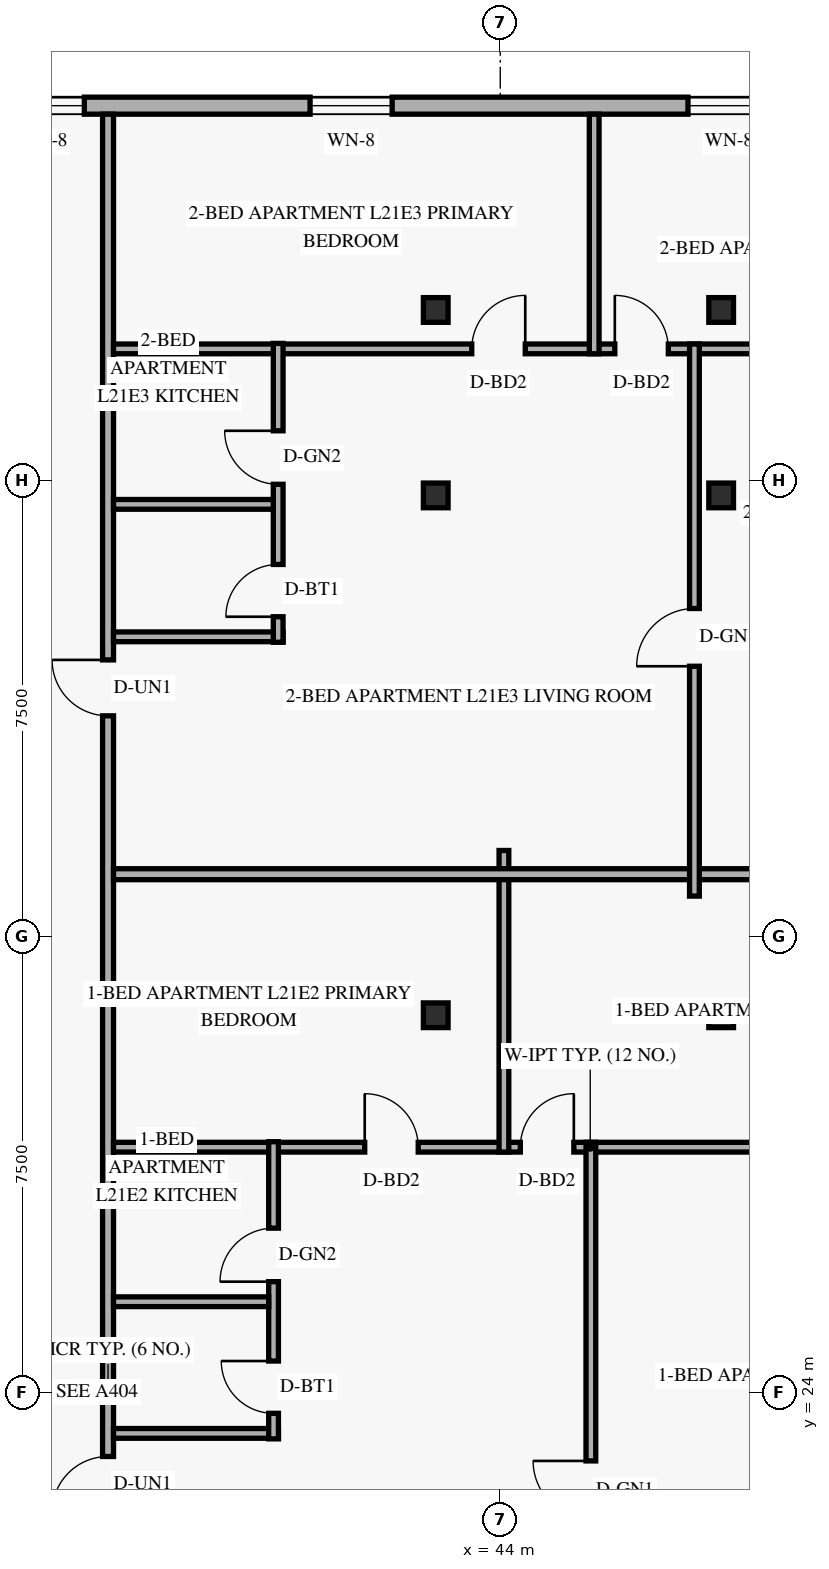
"""IFC4 building model, lengths in metres.
Left out: names, types, materials, properties, quantities, classifications, styles, units other than length and angle.
Written with IfcOpenShell. Run it as: python <this file> out.ifc"""

import sys

from ifc_helpers import new_model, si_unit, direction, frame, frame_2d, origin, origin_2d, place, context, subcontext, project, spatial, rectangle, hollow_rectangle, extrude, element, fill, save


model = new_model("IFC4")
c1 = context("Model", 3, precision=1e-05, world=origin(), true_north=direction((0.0, 1.0)))
c2 = subcontext(c1, "Body", "Model", "MODEL_VIEW")
j1 = project(units=[si_unit("LENGTHUNIT", "METRE"), si_unit("PLANEANGLEUNIT", "RADIAN")], contexts=[c1])
p1 = place(None, origin())
s1 = spatial("IfcSite", under=j1, at=p1, CompositionType="ELEMENT")
p2 = place(p1, origin())
s2 = spatial("IfcBuilding", under=s1, at=p2, CompositionType="ELEMENT")
p3 = place(p2, frame((0.0, 0.0, 84.0)))
s3 = spatial("IfcBuildingStorey", under=s2, at=p3, CompositionType="ELEMENT", Elevation=84.0)
for number, where, z_axis, x_axis in (
    (1, (42.876, 30.2, 0.0), (0.035, 0.0, 0.999), (0.0, 1.0, 0.0)),
    (2, (42.876, 38.75, 0.0), (0.035, 0.0, 0.999), (0.0, 1.0, 0.0)),
    (3, (42.876, 41.8, 0.0), (0.035, 0.0, 0.999), (0.0, 1.0, 0.0)),
):
    element("IfcColumn", number, at=place(p3, frame(where, z_axis=z_axis, x_axis=x_axis)), inside=s3, PredefinedType="COLUMN", context=c2, shape_type="SweptSolid", body=[
        extrude(hollow_rectangle(XDim=0.406, YDim=0.406, WallThickness=0.016, at=origin_2d()), origin(), (0.0, 0.0, 1.0), 3.602),
    ])
for number, where, z_axis, x_axis in (
    (4, (47.529, 30.2, 0.0), (0.058, 0.0, 0.998), (0.0, 1.0, 0.0)),
    (5, (47.529, 38.75, 0.0), (0.058, 0.0, 0.998), (0.0, 1.0, 0.0)),
    (6, (47.529, 41.8, 0.0), (0.058, 0.0, 0.998), (0.0, 1.0, 0.0)),
):
    element("IfcColumn", number, at=place(p3, frame(where, z_axis=z_axis, x_axis=x_axis)), inside=s3, PredefinedType="COLUMN", context=c2, shape_type="SweptSolid", body=[
        extrude(hollow_rectangle(XDim=0.406, YDim=0.406, WallThickness=0.016, at=origin_2d()), origin(), (0.0, 0.0, 1.0), 3.606),
    ])
p4 = place(p3, frame((49.98, 45.16, 0.0), z_axis=(0.0, 0.0, 1.0), x_axis=(-1.0, 0.0, 0.0)))
e7 = element("IfcWall", 7, at=p4, inside=s3, PredefinedType="SOLIDWALL", context=c2, shape_type="SweptSolid", body=[
    extrude(rectangle(XDim=36.56, YDim=0.28, at=frame_2d((18.28, 0.0))), origin(), (0.0, 0.0, 1.0), 3.36),
])
p5 = place(p4, frame((31.14, 0.0, 0.85)))
e8 = element("IfcOpeningElement", 8, at=p5, cuts=e7, PredefinedType="OPENING", context=c2, shape_type="SweptSolid", body=[
    extrude(rectangle(XDim=1.35, YDim=1.55, at=frame_2d((0.675, 0.775))), frame((0.0, 0.15, 0.0), z_axis=(0.0, -1.0, 0.0), x_axis=(1.0, 0.0, 0.0)), (0.0, 0.0, 1.0), 0.3),
])
p6 = place(p4, frame((26.605, 0.0, 0.85)))
e9 = element("IfcOpeningElement", 9, at=p6, cuts=e7, PredefinedType="OPENING", context=c2, shape_type="SweptSolid", body=[
    extrude(rectangle(XDim=1.35, YDim=1.55, at=frame_2d((0.675, 0.775))), frame((0.0, 0.15, 0.0), z_axis=(0.0, -1.0, 0.0), x_axis=(1.0, 0.0, 0.0)), (0.0, 0.0, 1.0), 0.3),
])
p7 = place(p4, frame((22.754, 0.0, 0.85)))
e10 = element("IfcOpeningElement", 10, at=p7, cuts=e7, PredefinedType="OPENING", context=c2, shape_type="SweptSolid", body=[
    extrude(rectangle(XDim=1.35, YDim=1.55, at=frame_2d((0.675, 0.775))), frame((0.0, 0.15, 0.0), z_axis=(0.0, -1.0, 0.0), x_axis=(1.0, 0.0, 0.0)), (0.0, 0.0, 1.0), 0.3),
])
p8 = place(p4, frame((16.919, 0.0, 0.85)))
e11 = element("IfcOpeningElement", 11, at=p8, cuts=e7, PredefinedType="OPENING", context=c2, shape_type="SweptSolid", body=[
    extrude(rectangle(XDim=1.35, YDim=1.55, at=frame_2d((0.675, 0.775))), frame((0.0, 0.15, 0.0), z_axis=(0.0, -1.0, 0.0), x_axis=(1.0, 0.0, 0.0)), (0.0, 0.0, 1.0), 0.3),
])
p9 = place(p4, frame((12.82, 0.0, 0.85)))
e12 = element("IfcOpeningElement", 12, at=p9, cuts=e7, PredefinedType="OPENING", context=c2, shape_type="SweptSolid", body=[
    extrude(rectangle(XDim=1.35, YDim=1.55, at=frame_2d((0.675, 0.775))), frame((0.0, 0.15, 0.0), z_axis=(0.0, -1.0, 0.0), x_axis=(1.0, 0.0, 0.0)), (0.0, 0.0, 1.0), 0.3),
])
p10 = place(p4, frame((7.758, 0.0, 0.85)))
e13 = element("IfcOpeningElement", 13, at=p10, cuts=e7, PredefinedType="OPENING", context=c2, shape_type="SweptSolid", body=[
    extrude(rectangle(XDim=1.35, YDim=1.55, at=frame_2d((0.675, 0.775))), frame((0.0, 0.15, 0.0), z_axis=(0.0, -1.0, 0.0), x_axis=(1.0, 0.0, 0.0)), (0.0, 0.0, 1.0), 0.3),
])
p11 = place(p4, frame((1.542, 0.0, 0.85)))
e14 = element("IfcOpeningElement", 14, at=p11, cuts=e7, PredefinedType="OPENING", context=c2, shape_type="SweptSolid", body=[
    extrude(rectangle(XDim=1.35, YDim=1.55, at=frame_2d((0.675, 0.775))), frame((0.0, 0.15, 0.0), z_axis=(0.0, -1.0, 0.0), x_axis=(1.0, 0.0, 0.0)), (0.0, 0.0, 1.0), 0.3),
])
p12 = place(p3, frame((37.55, 2.98, 0.0), z_axis=(0.0, 0.0, 1.0), x_axis=(0.0, 1.0, 0.0)))
e15 = element("IfcWall", 15, at=p12, inside=s3, PredefinedType="STANDARD", context=c2, shape_type="SweptSolid", body=[
    extrude(rectangle(XDim=42.04, YDim=0.18, at=frame_2d((21.02, 0.0))), origin(), (0.0, 0.0, 1.0), 2.731),
])
p13 = place(p12, frame((8.69, 0.0, 0.0)))
e16 = element("IfcOpeningElement", 16, at=p13, cuts=e15, PredefinedType="OPENING", context=c2, shape_type="SweptSolid", body=[
    extrude(rectangle(XDim=0.92, YDim=2.15, at=frame_2d((0.46, 1.075))), frame((0.0, 0.1, 0.0), z_axis=(0.0, -1.0, 0.0), x_axis=(1.0, 0.0, 0.0)), (0.0, 0.0, 1.0), 0.2),
])
p14 = place(p12, frame((19.043, 0.0, 0.0)))
e17 = element("IfcOpeningElement", 17, at=p14, cuts=e15, PredefinedType="OPENING", context=c2, shape_type="SweptSolid", body=[
    extrude(rectangle(XDim=0.92, YDim=2.15, at=frame_2d((0.46, 1.075))), frame((0.0, 0.1, 0.0), z_axis=(0.0, -1.0, 0.0), x_axis=(1.0, 0.0, 0.0)), (0.0, 0.0, 1.0), 0.2),
])
p15 = place(p12, frame((32.145, 0.0, 0.0)))
e18 = element("IfcOpeningElement", 18, at=p15, cuts=e15, PredefinedType="OPENING", context=c2, shape_type="SweptSolid", body=[
    extrude(rectangle(XDim=0.92, YDim=2.15, at=frame_2d((0.46, 1.075))), frame((0.0, 0.1, 0.0), z_axis=(0.0, -1.0, 0.0), x_axis=(1.0, 0.0, 0.0)), (0.0, 0.0, 1.0), 0.2),
])
p16 = place(p3, frame((37.64, 28.03, 0.0), z_axis=(0.0, 0.0, 1.0), x_axis=(1.0, 0.0, 0.0)))
e19 = element("IfcWall", 19, at=p16, inside=s3, PredefinedType="PARTITIONING", context=c2, shape_type="SweptSolid", body=[
    extrude(rectangle(XDim=15.68, YDim=0.16, at=frame_2d((7.84, 0.0))), origin(), (0.0, 0.0, 1.0), 2.731),
])
p17 = place(p16, frame((4.131, 0.0, 0.0)))
e20 = element("IfcOpeningElement", 20, at=p17, cuts=e19, PredefinedType="OPENING", context=c2, shape_type="SweptSolid", body=[
    extrude(rectangle(XDim=0.88, YDim=2.14, at=frame_2d((0.44, 1.07))), frame((0.0, 0.09, 0.0), z_axis=(0.0, -1.0, 0.0), x_axis=(1.0, 0.0, 0.0)), (0.0, 0.0, 1.0), 0.18),
])
p18 = place(p16, frame((6.69, 0.0, 0.0)))
e21 = element("IfcOpeningElement", 21, at=p18, cuts=e19, PredefinedType="OPENING", context=c2, shape_type="SweptSolid", body=[
    extrude(rectangle(XDim=0.88, YDim=2.14, at=frame_2d((0.44, 1.07))), frame((0.0, 0.09, 0.0), z_axis=(0.0, -1.0, 0.0), x_axis=(1.0, 0.0, 0.0)), (0.0, 0.0, 1.0), 0.18),
])
p19 = place(p3, frame((37.64, 23.323, 0.0), z_axis=(0.0, 0.0, 1.0), x_axis=(1.0, 0.0, 0.0)))
e22 = element("IfcWall", 22, at=p19, inside=s3, PredefinedType="PLUMBINGWALL", context=c2, shape_type="SweptSolid", body=[
    extrude(rectangle(XDim=2.712, YDim=0.16, at=frame_2d((1.356, 0.0))), origin(), (0.0, 0.0, 1.0), 3.36),
])
p20 = place(p3, frame((40.272, 23.233, 0.0), z_axis=(0.0, 0.0, 1.0), x_axis=(0.0, 1.0, 0.0)))
e23 = element("IfcWall", 23, at=p20, inside=s3, PredefinedType="PLUMBINGWALL", context=c2, shape_type="SweptSolid", body=[
    extrude(rectangle(XDim=4.887, YDim=0.16, at=frame_2d((2.444, 0.0))), origin(), (0.0, 0.0, 1.0), 3.36),
])
p21 = place(p20, frame((0.42, 0.0, 0.0)))
e24 = element("IfcOpeningElement", 24, at=p21, cuts=e23, PredefinedType="OPENING", context=c2, shape_type="SweptSolid", body=[
    extrude(rectangle(XDim=0.86, YDim=2.12, at=frame_2d((0.43, 1.06))), frame((0.0, 0.09, 0.0), z_axis=(0.0, -1.0, 0.0), x_axis=(1.0, 0.0, 0.0)), (0.0, 0.0, 1.0), 0.18),
])
p22 = place(p20, frame((2.585, 0.0, 0.0)))
e25 = element("IfcOpeningElement", 25, at=p22, cuts=e23, PredefinedType="OPENING", context=c2, shape_type="SweptSolid", body=[
    extrude(rectangle(XDim=0.88, YDim=2.12, at=frame_2d((0.44, 1.06))), frame((0.0, 0.09, 0.0), z_axis=(0.0, -1.0, 0.0), x_axis=(1.0, 0.0, 0.0)), (0.0, 0.0, 1.0), 0.18),
])
p23 = place(p3, frame((37.64, 25.488, 0.0), z_axis=(0.0, 0.0, 1.0), x_axis=(1.0, 0.0, 0.0)))
e26 = element("IfcWall", 26, at=p23, inside=s3, PredefinedType="PLUMBINGWALL", context=c2, shape_type="SweptSolid", body=[
    extrude(rectangle(XDim=2.552, YDim=0.16, at=frame_2d((1.276, 0.0))), origin(), (0.0, 0.0, 1.0), 3.36),
])
p24 = place(p3, frame((45.49, 17.25, 0.0), z_axis=(0.0, 0.0, 1.0), x_axis=(0.0, 1.0, 0.0)))
e27 = element("IfcWall", 27, at=p24, inside=s3, PredefinedType="PARTITIONING", context=c2, shape_type="SweptSolid", body=[
    extrude(rectangle(XDim=10.86, YDim=0.16, at=frame_2d((5.43, 0.0))), origin(), (0.0, 0.0, 1.0), 2.731),
])
p25 = place(p24, frame((4.67, 0.0, 0.0)))
e28 = element("IfcOpeningElement", 28, at=p25, cuts=e27, PredefinedType="OPENING", context=c2, shape_type="SweptSolid", body=[
    extrude(rectangle(XDim=0.95, YDim=2.15, at=frame_2d((0.475, 1.075))), frame((0.0, 0.09, 0.0), z_axis=(0.0, -1.0, 0.0), x_axis=(1.0, 0.0, 0.0)), (0.0, 0.0, 1.0), 0.18),
])
p26 = place(p3, frame((44.061, 27.95, 0.0), z_axis=(0.0, 0.0, 1.0), x_axis=(0.0, 1.0, 0.0)))
e29 = element("IfcWall", 29, at=p26, inside=s3, PredefinedType="PARTITIONING", context=c2, shape_type="SweptSolid", body=[
    extrude(rectangle(XDim=4.96, YDim=0.16, at=frame_2d((2.48, 0.0))), origin(), (0.0, 0.0, 1.0), 2.731),
])
p27 = place(p3, frame((37.64, 32.52, 0.0), z_axis=(0.0, 0.0, 1.0), x_axis=(1.0, 0.0, 0.0)))
e30 = element("IfcWall", 30, at=p27, inside=s3, PredefinedType="PARTITIONING", context=c2, shape_type="SweptSolid", body=[
    extrude(rectangle(XDim=15.68, YDim=0.18, at=frame_2d((7.84, 0.0))), origin(), (0.0, 0.0, 1.0), 2.731),
])
p28 = place(p3, frame((37.64, 41.16, 0.0), z_axis=(0.0, 0.0, 1.0), x_axis=(1.0, 0.0, 0.0)))
e31 = element("IfcWall", 31, at=p28, inside=s3, PredefinedType="PARTITIONING", context=c2, shape_type="SweptSolid", body=[
    extrude(rectangle(XDim=15.68, YDim=0.16, at=frame_2d((7.84, 0.0))), origin(), (0.0, 0.0, 1.0), 2.731),
])
p29 = place(p28, frame((5.892, 0.0, 0.0)))
e32 = element("IfcOpeningElement", 32, at=p29, cuts=e31, PredefinedType="OPENING", context=c2, shape_type="SweptSolid", body=[
    extrude(rectangle(XDim=0.88, YDim=2.14, at=frame_2d((0.44, 1.07))), frame((0.0, 0.09, 0.0), z_axis=(0.0, -1.0, 0.0), x_axis=(1.0, 0.0, 0.0)), (0.0, 0.0, 1.0), 0.18),
])
p30 = place(p28, frame((8.244, 0.0, 0.0)))
e33 = element("IfcOpeningElement", 33, at=p30, cuts=e31, PredefinedType="OPENING", context=c2, shape_type="SweptSolid", body=[
    extrude(rectangle(XDim=0.88, YDim=2.14, at=frame_2d((0.44, 1.07))), frame((0.0, 0.09, 0.0), z_axis=(0.0, -1.0, 0.0), x_axis=(1.0, 0.0, 0.0)), (0.0, 0.0, 1.0), 0.18),
])
p31 = place(p3, frame((37.64, 36.425, 0.0), z_axis=(0.0, 0.0, 1.0), x_axis=(1.0, 0.0, 0.0)))
e34 = element("IfcWall", 34, at=p31, inside=s3, PredefinedType="PLUMBINGWALL", context=c2, shape_type="SweptSolid", body=[
    extrude(rectangle(XDim=2.788, YDim=0.16, at=frame_2d((1.394, 0.0))), origin(), (0.0, 0.0, 1.0), 3.36),
])
p32 = place(p3, frame((40.348, 36.334, 0.0), z_axis=(0.0, 0.0, 1.0), x_axis=(0.0, 1.0, 0.0)))
e35 = element("IfcWall", 35, at=p32, inside=s3, PredefinedType="PLUMBINGWALL", context=c2, shape_type="SweptSolid", body=[
    extrude(rectangle(XDim=4.916, YDim=0.16, at=frame_2d((2.458, 0.0))), origin(), (0.0, 0.0, 1.0), 2.731),
])
p33 = place(p32, frame((0.42, 0.0, 0.0)))
e36 = element("IfcOpeningElement", 36, at=p33, cuts=e35, PredefinedType="OPENING", context=c2, shape_type="SweptSolid", body=[
    extrude(rectangle(XDim=0.86, YDim=2.12, at=frame_2d((0.43, 1.06))), frame((0.0, 0.09, 0.0), z_axis=(0.0, -1.0, 0.0), x_axis=(1.0, 0.0, 0.0)), (0.0, 0.0, 1.0), 0.18),
])
p34 = place(p32, frame((2.598, 0.0, 0.0)))
e37 = element("IfcOpeningElement", 37, at=p34, cuts=e35, PredefinedType="OPENING", context=c2, shape_type="SweptSolid", body=[
    extrude(rectangle(XDim=0.88, YDim=2.12, at=frame_2d((0.44, 1.06))), frame((0.0, 0.09, 0.0), z_axis=(0.0, -1.0, 0.0), x_axis=(1.0, 0.0, 0.0)), (0.0, 0.0, 1.0), 0.18),
])
p35 = place(p3, frame((37.64, 38.603, 0.0), z_axis=(0.0, 0.0, 1.0), x_axis=(1.0, 0.0, 0.0)))
e38 = element("IfcWall", 38, at=p35, inside=s3, PredefinedType="PLUMBINGWALL", context=c2, shape_type="SweptSolid", body=[
    extrude(rectangle(XDim=2.628, YDim=0.16, at=frame_2d((1.314, 0.0))), origin(), (0.0, 0.0, 1.0), 2.731),
])
p36 = place(p3, frame((47.194, 32.16, 0.0), z_axis=(0.0, 0.0, 1.0), x_axis=(0.0, 1.0, 0.0)))
e39 = element("IfcWall", 39, at=p36, inside=s3, PredefinedType="PARTITIONING", context=c2, shape_type="SweptSolid", body=[
    extrude(rectangle(XDim=9.08, YDim=0.16, at=frame_2d((4.54, 0.0))), origin(), (0.0, 0.0, 1.0), 2.731),
])
p37 = place(p36, frame((3.78, 0.0, 0.0)))
e40 = element("IfcOpeningElement", 40, at=p37, cuts=e39, PredefinedType="OPENING", context=c2, shape_type="SweptSolid", body=[
    extrude(rectangle(XDim=0.95, YDim=2.15, at=frame_2d((0.475, 1.075))), frame((0.0, 0.09, 0.0), z_axis=(0.0, -1.0, 0.0), x_axis=(1.0, 0.0, 0.0)), (0.0, 0.0, 1.0), 0.18),
])
p38 = place(p3, frame((45.545, 41.08, 0.0), z_axis=(0.0, 0.0, 1.0), x_axis=(0.0, 1.0, 0.0)))
e41 = element("IfcWall", 41, at=p38, inside=s3, PredefinedType="PARTITIONING", context=c2, shape_type="SweptSolid", body=[
    extrude(rectangle(XDim=3.94, YDim=0.16, at=frame_2d((1.97, 0.0))), origin(), (0.0, 0.0, 1.0), 2.809),
])
p39 = place(p9, origin())
e42 = element("IfcWindow", 42, at=p39, inside=s3, PartitioningType="SINGLE_PANEL", PredefinedType="WINDOW", context=c2, shape_type="SweptSolid", body=[
    extrude(rectangle(XDim=1.35, YDim=1.55, at=frame_2d((0.675, 0.775))), frame((0.0, 0.03, 0.0), z_axis=(0.0, -1.0, 0.0), x_axis=(1.0, 0.0, 0.0)), (0.0, 0.0, 1.0), 0.06),
])
fill(e12, e42)
p40 = place(p10, origin())
e43 = element("IfcWindow", 43, at=p40, inside=s3, PartitioningType="SINGLE_PANEL", PredefinedType="WINDOW", context=c2, shape_type="SweptSolid", body=[
    extrude(rectangle(XDim=1.35, YDim=1.55, at=frame_2d((0.675, 0.775))), frame((0.0, 0.03, 0.0), z_axis=(0.0, -1.0, 0.0), x_axis=(1.0, 0.0, 0.0)), (0.0, 0.0, 1.0), 0.06),
])
fill(e13, e43)
p41 = place(p11, origin())
e44 = element("IfcWindow", 44, at=p41, inside=s3, PartitioningType="SINGLE_PANEL", PredefinedType="WINDOW", context=c2, shape_type="SweptSolid", body=[
    extrude(rectangle(XDim=1.35, YDim=1.55, at=frame_2d((0.675, 0.775))), frame((0.0, 0.03, 0.0), z_axis=(0.0, -1.0, 0.0), x_axis=(1.0, 0.0, 0.0)), (0.0, 0.0, 1.0), 0.06),
])
fill(e14, e44)
p42 = place(p25, origin())
e45 = element("IfcDoor", 45, at=p42, inside=s3, OperationType="SINGLE_SWING_RIGHT", PredefinedType="DOOR", context=c2, shape_type="SweptSolid", body=[
    extrude(rectangle(XDim=0.95, YDim=2.15, at=frame_2d((0.475, 1.075))), frame((0.0, 0.025, 0.0), z_axis=(0.0, -1.0, 0.0), x_axis=(1.0, 0.0, 0.0)), (0.0, 0.0, 1.0), 0.05),
])
fill(e28, e45)
p43 = place(p14, origin())
e46 = element("IfcDoor", 46, at=p43, inside=s3, OperationType="SINGLE_SWING_LEFT", PredefinedType="DOOR", context=c2, shape_type="SweptSolid", body=[
    extrude(rectangle(XDim=0.92, YDim=2.15, at=frame_2d((0.46, 1.075))), frame((0.0, 0.025, 0.0), z_axis=(0.0, -1.0, 0.0), x_axis=(1.0, 0.0, 0.0)), (0.0, 0.0, 1.0), 0.05),
])
fill(e17, e46)
p44 = place(p21, origin())
e47 = element("IfcDoor", 47, at=p44, inside=s3, OperationType="SINGLE_SWING_RIGHT", PredefinedType="DOOR", context=c2, shape_type="SweptSolid", body=[
    extrude(rectangle(XDim=0.86, YDim=2.12, at=frame_2d((0.43, 1.06))), frame((0.0, 0.025, 0.0), z_axis=(0.0, -1.0, 0.0), x_axis=(1.0, 0.0, 0.0)), (0.0, 0.0, 1.0), 0.05),
])
fill(e24, e47)
p45 = place(p22, origin())
e48 = element("IfcDoor", 48, at=p45, inside=s3, OperationType="SINGLE_SWING_LEFT", PredefinedType="DOOR", context=c2, shape_type="SweptSolid", body=[
    extrude(rectangle(XDim=0.88, YDim=2.12, at=frame_2d((0.44, 1.06))), frame((0.0, 0.025, 0.0), z_axis=(0.0, -1.0, 0.0), x_axis=(1.0, 0.0, 0.0)), (0.0, 0.0, 1.0), 0.05),
])
fill(e25, e48)
p46 = place(p17, origin())
e49 = element("IfcDoor", 49, at=p46, inside=s3, OperationType="SINGLE_SWING_LEFT", PredefinedType="DOOR", context=c2, shape_type="SweptSolid", body=[
    extrude(rectangle(XDim=0.88, YDim=2.14, at=frame_2d((0.44, 1.07))), frame((0.0, 0.025, 0.0), z_axis=(0.0, -1.0, 0.0), x_axis=(1.0, 0.0, 0.0)), (0.0, 0.0, 1.0), 0.05),
])
fill(e20, e49)
p47 = place(p18, origin())
e50 = element("IfcDoor", 50, at=p47, inside=s3, OperationType="SINGLE_SWING_RIGHT", PredefinedType="DOOR", context=c2, shape_type="SweptSolid", body=[
    extrude(rectangle(XDim=0.88, YDim=2.14, at=frame_2d((0.44, 1.07))), frame((0.0, 0.025, 0.0), z_axis=(0.0, -1.0, 0.0), x_axis=(1.0, 0.0, 0.0)), (0.0, 0.0, 1.0), 0.05),
])
fill(e21, e50)
p48 = place(p37, origin())
e51 = element("IfcDoor", 51, at=p48, inside=s3, OperationType="SINGLE_SWING_LEFT", PredefinedType="DOOR", context=c2, shape_type="SweptSolid", body=[
    extrude(rectangle(XDim=0.95, YDim=2.15, at=frame_2d((0.475, 1.075))), frame((0.0, 0.025, 0.0), z_axis=(0.0, -1.0, 0.0), x_axis=(1.0, 0.0, 0.0)), (0.0, 0.0, 1.0), 0.05),
])
fill(e40, e51)
p49 = place(p15, origin())
e52 = element("IfcDoor", 52, at=p49, inside=s3, OperationType="SINGLE_SWING_RIGHT", PredefinedType="DOOR", context=c2, shape_type="SweptSolid", body=[
    extrude(rectangle(XDim=0.92, YDim=2.15, at=frame_2d((0.46, 1.075))), frame((0.0, 0.025, 0.0), z_axis=(0.0, -1.0, 0.0), x_axis=(1.0, 0.0, 0.0)), (0.0, 0.0, 1.0), 0.05),
])
fill(e18, e52)
p50 = place(p33, origin())
e53 = element("IfcDoor", 53, at=p50, inside=s3, OperationType="SINGLE_SWING_LEFT", PredefinedType="DOOR", context=c2, shape_type="SweptSolid", body=[
    extrude(rectangle(XDim=0.86, YDim=2.12, at=frame_2d((0.43, 1.06))), frame((0.0, 0.025, 0.0), z_axis=(0.0, -1.0, 0.0), x_axis=(1.0, 0.0, 0.0)), (0.0, 0.0, 1.0), 0.05),
])
fill(e36, e53)
p51 = place(p34, origin())
e54 = element("IfcDoor", 54, at=p51, inside=s3, OperationType="SINGLE_SWING_RIGHT", PredefinedType="DOOR", context=c2, shape_type="SweptSolid", body=[
    extrude(rectangle(XDim=0.88, YDim=2.12, at=frame_2d((0.44, 1.06))), frame((0.0, 0.025, 0.0), z_axis=(0.0, -1.0, 0.0), x_axis=(1.0, 0.0, 0.0)), (0.0, 0.0, 1.0), 0.05),
])
fill(e37, e54)
p52 = place(p29, origin())
e55 = element("IfcDoor", 55, at=p52, inside=s3, OperationType="SINGLE_SWING_RIGHT", PredefinedType="DOOR", context=c2, shape_type="SweptSolid", body=[
    extrude(rectangle(XDim=0.88, YDim=2.14, at=frame_2d((0.44, 1.07))), frame((0.0, 0.025, 0.0), z_axis=(0.0, -1.0, 0.0), x_axis=(1.0, 0.0, 0.0)), (0.0, 0.0, 1.0), 0.05),
])
fill(e32, e55)
p53 = place(p30, origin())
e56 = element("IfcDoor", 56, at=p53, inside=s3, OperationType="SINGLE_SWING_LEFT", PredefinedType="DOOR", context=c2, shape_type="SweptSolid", body=[
    extrude(rectangle(XDim=0.88, YDim=2.14, at=frame_2d((0.44, 1.07))), frame((0.0, 0.025, 0.0), z_axis=(0.0, -1.0, 0.0), x_axis=(1.0, 0.0, 0.0)), (0.0, 0.0, 1.0), 0.05),
])
fill(e33, e56)
save(model, sys.argv[1])
